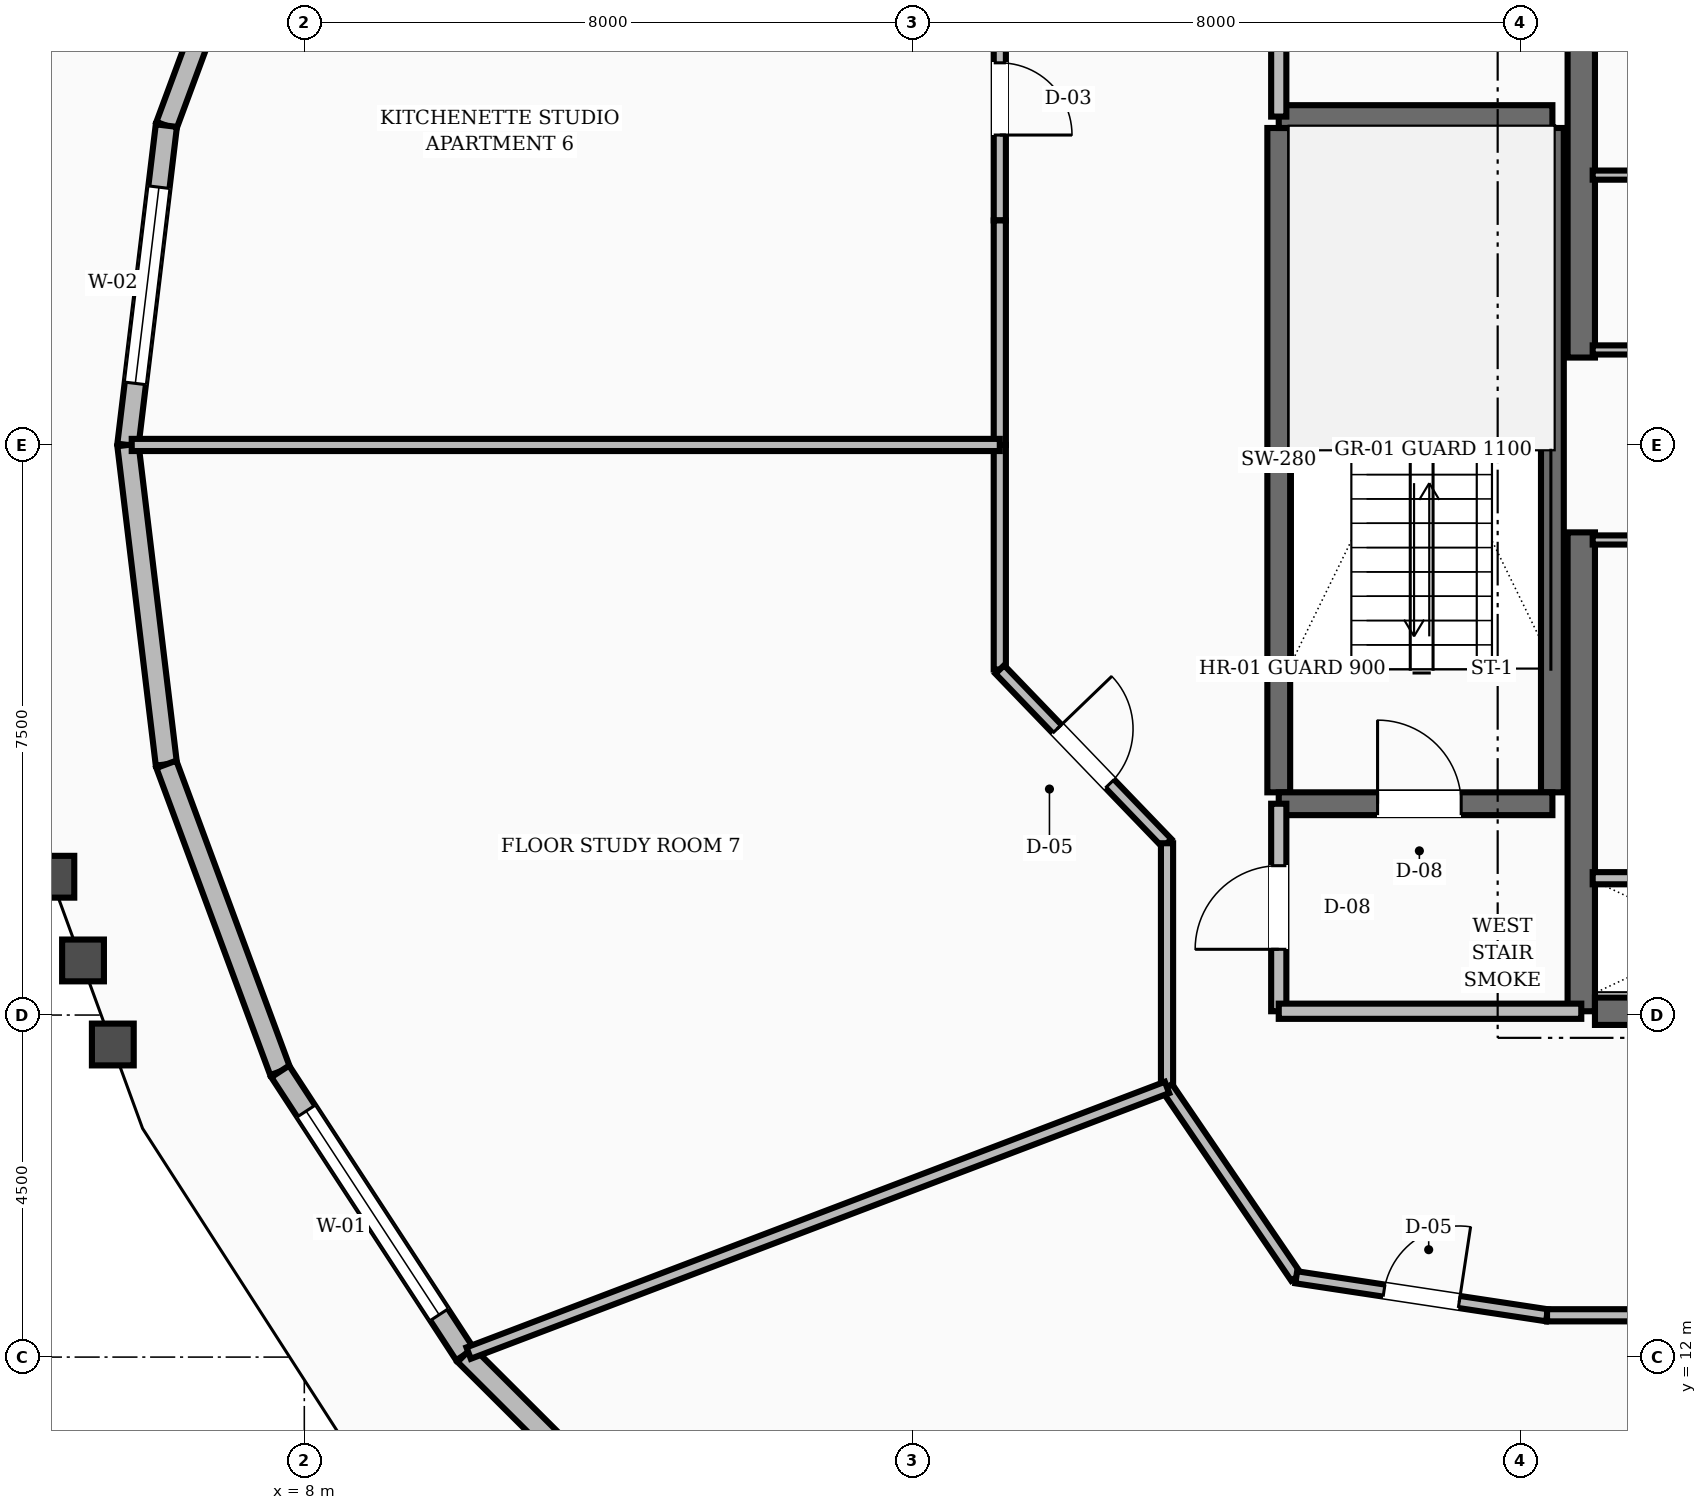
"""IFC4 building model, lengths in metres.
Left out: names, types, materials, properties, quantities, classifications, styles, units other than length and angle.
Written with IfcOpenShell. Run it as: python <this file> out.ifc"""

import sys

from ifc_helpers import new_model, si_unit, direction, frame, frame_2d, origin, place, context, subcontext, project, spatial, rectangle, extrude, element, fill, save


model = new_model("IFC4")
c1 = context("Model", 3, precision=1e-05, world=origin(), true_north=direction((0.0, 1.0)))
c2 = subcontext(c1, "Body", "Model", "MODEL_VIEW")
j1 = project(units=[si_unit("LENGTHUNIT", "METRE"), si_unit("PLANEANGLEUNIT", "RADIAN")], contexts=[c1])
p1 = place(None, origin())
s1 = spatial("IfcSite", under=j1, at=p1, CompositionType="ELEMENT")
p2 = place(p1, origin())
s2 = spatial("IfcBuilding", under=s1, at=p2, CompositionType="ELEMENT")
p3 = place(p2, frame((0.0, 0.0, 153.2)))
s3 = spatial("IfcBuildingStorey", under=s2, at=p3, CompositionType="ELEMENT", Elevation=153.2)
for number, where, z_axis, x_axis in (
    (1, (24.8, 16.55, 0.0), (0.0, 0.0, 1.0), (0.0, 1.0, 0.0)),
    (2, (24.8, 25.15, 0.0), (0.0, 0.0, 1.0), (0.0, 1.0, 0.0)),
):
    element("IfcWall", number, at=place(p3, frame(where, z_axis=z_axis, x_axis=x_axis)), inside=s3, PredefinedType="SHEAR", context=c2, shape_type="SweptSolid", body=[
        extrude(rectangle(XDim=6.3, YDim=0.36, at=frame_2d((3.15, 0.0))), origin(), (0.0, 0.0, 1.0), 3.6),
    ])
p4 = place(p3, frame((24.98, 16.55, 0.0), z_axis=(0.0, 0.0, 1.0), x_axis=(1.0, 0.0, 0.0)))
e3 = element("IfcWall", 3, at=p4, inside=s3, PredefinedType="SHEAR", context=c2, shape_type="SweptSolid", body=[
    extrude(rectangle(XDim=3.22, YDim=0.36, at=frame_2d((1.61, 0.0))), origin(), (0.0, 0.0, 1.0), 3.6),
])
for number, where, z_axis, x_axis in (
    (4, (20.82, 19.43, 0.0), (0.0, 0.0, 1.0), (0.0, 1.0, 0.0)),
    (5, (24.42, 19.43, 0.0), (0.0, 0.0, 1.0), (0.0, 1.0, 0.0)),
):
    element("IfcWall", number, at=place(p3, frame(where, z_axis=z_axis, x_axis=x_axis)), inside=s3, PredefinedType="SHEAR", context=c2, shape_type="SweptSolid", body=[
        extrude(rectangle(XDim=8.74, YDim=0.3, at=frame_2d((4.37, 0.0))), origin(), (0.0, 0.0, 1.0), 3.6),
    ])
p5 = place(p3, frame((20.82, 19.28, 0.0), z_axis=(0.0, 0.0, 1.0), x_axis=(1.0, 0.0, 0.0)))
e6 = element("IfcWall", 6, at=p5, inside=s3, PredefinedType="SHEAR", context=c2, shape_type="SweptSolid", body=[
    extrude(rectangle(XDim=3.6, YDim=0.3, at=frame_2d((1.8, 0.0))), origin(), (0.0, 0.0, 1.0), 3.6),
])
p6 = place(p5, frame((1.3, 0.0, 0.0)))
e7 = element("IfcOpeningElement", 7, at=p6, cuts=e6, PredefinedType="OPENING", context=c2, shape_type="SweptSolid", body=[
    extrude(rectangle(XDim=1.1, YDim=2.1, at=frame_2d((0.55, 1.05))), frame((0.0, 0.16, 0.0), z_axis=(0.0, -1.0, 0.0), x_axis=(1.0, 0.0, 0.0)), (0.0, 0.0, 1.0), 0.32),
])
p7 = place(p3, frame((20.82, 28.32, 0.0), z_axis=(0.0, 0.0, 1.0), x_axis=(1.0, 0.0, 0.0)))
e8 = element("IfcWall", 8, at=p7, inside=s3, PredefinedType="SHEAR", context=c2, shape_type="SweptSolid", body=[
    extrude(rectangle(XDim=3.6, YDim=0.3, at=frame_2d((1.8, 0.0))), origin(), (0.0, 0.0, 1.0), 3.6),
])
p8 = place(p3, frame((7.683, 32.242, 0.0), z_axis=(0.0, 0.0, 1.0), x_axis=(-0.347600366377, -0.937642781284, 0.0)))
e9 = element("IfcWall", 9, at=p8, inside=s3, PredefinedType="STANDARD", context=c2, shape_type="SweptSolid", body=[
    extrude(rectangle(XDim=4.309, YDim=0.28, at=frame_2d((2.155, 0.0))), origin(), (0.0, 0.0, 1.0), 2.82),
])
p9 = place(p3, frame((6.185, 28.201, 0.0), z_axis=(0.0, 0.0, 1.0), x_axis=(-0.119481907098, -0.992836378199, 0.0)))
e10 = element("IfcWall", 10, at=p9, inside=s3, PredefinedType="STANDARD", context=c2, shape_type="SweptSolid", body=[
    extrude(rectangle(XDim=4.232, YDim=0.28, at=frame_2d((2.116, 0.0))), origin(), (0.0, 0.0, 1.0), 2.82),
])
p10 = place(p9, frame((0.816, 0.0, 0.8)))
e11 = element("IfcOpeningElement", 11, at=p10, cuts=e10, PredefinedType="OPENING", context=c2, shape_type="SweptSolid", body=[
    extrude(rectangle(XDim=2.6, YDim=1.65, at=frame_2d((1.3, 0.825))), frame((0.0, 0.15, 0.0), z_axis=(0.0, -1.0, 0.0), x_axis=(1.0, 0.0, 0.0)), (0.0, 0.0, 1.0), 0.3),
])
p11 = place(p3, frame((5.679, 24.0, 0.0), z_axis=(0.0, 0.0, 1.0), x_axis=(0.119481907098, -0.992836378199, 0.0)))
e12 = element("IfcWall", 12, at=p11, inside=s3, PredefinedType="STANDARD", context=c2, shape_type="SweptSolid", body=[
    extrude(rectangle(XDim=4.232, YDim=0.28, at=frame_2d((2.116, 0.0))), origin(), (0.0, 0.0, 1.0), 2.82),
])
p12 = place(p3, frame((6.185, 19.799, 0.0), z_axis=(0.0, 0.0, 1.0), x_axis=(0.347600366377, -0.937642781284, 0.0)))
e13 = element("IfcWall", 13, at=p12, inside=s3, PredefinedType="STANDARD", context=c2, shape_type="SweptSolid", body=[
    extrude(rectangle(XDim=4.309, YDim=0.28, at=frame_2d((2.155, 0.0))), origin(), (0.0, 0.0, 1.0), 2.82),
])
p13 = place(p3, frame((7.683, 15.758, 0.0), z_axis=(0.0, 0.0, 1.0), x_axis=(0.546910623985, -0.837190999338, 0.0)))
e14 = element("IfcWall", 14, at=p13, inside=s3, PredefinedType="STANDARD", context=c2, shape_type="SweptSolid", body=[
    extrude(rectangle(XDim=4.448, YDim=0.28, at=frame_2d((2.224, 0.0))), origin(), (0.0, 0.0, 1.0), 2.82),
])
p14 = place(p13, frame((0.624, 0.0, 0.8)))
e15 = element("IfcOpeningElement", 15, at=p14, cuts=e14, PredefinedType="OPENING", context=c2, shape_type="SweptSolid", body=[
    extrude(rectangle(XDim=3.2, YDim=1.65, at=frame_2d((1.6, 0.825))), frame((0.0, 0.15, 0.0), z_axis=(0.0, -1.0, 0.0), x_axis=(1.0, 0.0, 0.0)), (0.0, 0.0, 1.0), 0.3),
])
p15 = place(p3, frame((10.115, 12.035, 0.0), z_axis=(0.0, 0.0, 1.0), x_axis=(0.708162399008, -0.706049585108, 0.0)))
e16 = element("IfcWall", 16, at=p15, inside=s3, PredefinedType="STANDARD", context=c2, shape_type="SweptSolid", body=[
    extrude(rectangle(XDim=4.622, YDim=0.28, at=frame_2d((2.311, 0.0))), origin(), (0.0, 0.0, 1.0), 2.82),
])
p16 = place(p3, frame((20.82, 16.55, 0.0), z_axis=(0.0, 0.0, 1.0), x_axis=(0.0, 1.0, 0.0)))
e17 = element("IfcWall", 17, at=p16, inside=s3, PredefinedType="SOLIDWALL", context=c2, shape_type="SweptSolid", body=[
    extrude(rectangle(XDim=2.73, YDim=0.2, at=frame_2d((1.365, 0.0))), origin(), (0.0, 0.0, 1.0), 2.8),
])
p17 = place(p16, frame((0.815, 0.0, 0.0)))
e18 = element("IfcOpeningElement", 18, at=p17, cuts=e17, PredefinedType="OPENING", context=c2, shape_type="SweptSolid", body=[
    extrude(rectangle(XDim=1.1, YDim=2.1, at=frame_2d((0.55, 1.05))), frame((0.0, 0.11, 0.0), z_axis=(0.0, -1.0, 0.0), x_axis=(1.0, 0.0, 0.0)), (0.0, 0.0, 1.0), 0.22),
])
p18 = place(p3, frame((20.82, 16.55, 0.0), z_axis=(0.0, 0.0, 1.0), x_axis=(1.0, 0.0, 0.0)))
e19 = element("IfcWall", 19, at=p18, inside=s3, PredefinedType="SOLIDWALL", context=c2, shape_type="SweptSolid", body=[
    extrude(rectangle(XDim=3.98, YDim=0.2, at=frame_2d((1.99, 0.0))), origin(), (0.0, 0.0, 1.0), 2.8),
])
p19 = place(p3, frame((20.82, 28.32, 0.0), z_axis=(0.0, 0.0, 1.0), x_axis=(0.0, 1.0, 0.0)))
e20 = element("IfcWall", 20, at=p19, inside=s3, PredefinedType="SOLIDWALL", context=c2, shape_type="SweptSolid", body=[
    extrude(rectangle(XDim=3.13, YDim=0.2, at=frame_2d((1.565, 0.0))), origin(), (0.0, 0.0, 1.0), 2.8),
])
p20 = place(p19, frame((1.09, 0.0, 0.0)))
e21 = element("IfcOpeningElement", 21, at=p20, cuts=e20, PredefinedType="OPENING", context=c2, shape_type="SweptSolid", body=[
    extrude(rectangle(XDim=0.95, YDim=2.1, at=frame_2d((0.475, 1.05))), frame((0.0, 0.11, 0.0), z_axis=(0.0, -1.0, 0.0), x_axis=(1.0, 0.0, 0.0)), (0.0, 0.0, 1.0), 0.22),
])
p21 = place(p3, frame((24.95, 18.3, 0.0), z_axis=(0.0, 0.0, 1.0), x_axis=(1.0, 0.0, 0.0)))
e22 = element("IfcWall", 22, at=p21, inside=s3, PredefinedType="SOLIDWALL", context=c2, shape_type="SweptSolid", body=[
    extrude(rectangle(XDim=3.2, YDim=0.16, at=frame_2d((1.6, 0.0))), origin(), (0.0, 0.0, 1.0), 2.8),
])
p22 = place(p3, frame((24.95, 25.25, 0.0), z_axis=(0.0, 0.0, 1.0), x_axis=(1.0, 0.0, 0.0)))
e23 = element("IfcWall", 23, at=p22, inside=s3, PredefinedType="PARTITIONING", context=c2, shape_type="SweptSolid", body=[
    extrude(rectangle(XDim=3.2, YDim=0.12, at=frame_2d((1.6, 0.0))), origin(), (0.0, 0.0, 1.0), 2.8),
])
p23 = place(p22, frame((1.125, 0.0, 0.0)))
e24 = element("IfcOpeningElement", 24, at=p23, cuts=e23, PredefinedType="OPENING", context=c2, shape_type="SweptSolid", body=[
    extrude(rectangle(XDim=0.95, YDim=2.1, at=frame_2d((0.475, 1.05))), frame((0.0, 0.07, 0.0), z_axis=(0.0, -1.0, 0.0), x_axis=(1.0, 0.0, 0.0)), (0.0, 0.0, 1.0), 0.14),
])
p24 = place(p3, frame((24.95, 22.75, 0.0), z_axis=(0.0, 0.0, 1.0), x_axis=(1.0, 0.0, 0.0)))
e25 = element("IfcWall", 25, at=p24, inside=s3, PredefinedType="PARTITIONING", context=c2, shape_type="SweptSolid", body=[
    extrude(rectangle(XDim=3.2, YDim=0.12, at=frame_2d((1.6, 0.0))), origin(), (0.0, 0.0, 1.0), 2.8),
])
p25 = place(p24, frame((1.125, 0.0, 0.0)))
e26 = element("IfcOpeningElement", 26, at=p25, cuts=e25, PredefinedType="OPENING", context=c2, shape_type="SweptSolid", body=[
    extrude(rectangle(XDim=0.95, YDim=2.1, at=frame_2d((0.475, 1.05))), frame((0.0, 0.07, 0.0), z_axis=(0.0, -1.0, 0.0), x_axis=(1.0, 0.0, 0.0)), (0.0, 0.0, 1.0), 0.14),
])
p26 = place(p3, frame((24.95, 27.55, 0.0), z_axis=(0.0, 0.0, 1.0), x_axis=(1.0, 0.0, 0.0)))
e27 = element("IfcWall", 27, at=p26, inside=s3, PredefinedType="PARTITIONING", context=c2, shape_type="SweptSolid", body=[
    extrude(rectangle(XDim=3.2, YDim=0.12, at=frame_2d((1.6, 0.0))), origin(), (0.0, 0.0, 1.0), 2.8),
])
p27 = place(p26, frame((1.125, 0.0, 0.0)))
e28 = element("IfcOpeningElement", 28, at=p27, cuts=e27, PredefinedType="OPENING", context=c2, shape_type="SweptSolid", body=[
    extrude(rectangle(XDim=0.95, YDim=2.1, at=frame_2d((0.475, 1.05))), frame((0.0, 0.07, 0.0), z_axis=(0.0, -1.0, 0.0), x_axis=(1.0, 0.0, 0.0)), (0.0, 0.0, 1.0), 0.14),
])
p28 = place(p3, frame((17.15, 30.151, 0.0), z_axis=(0.0, 0.0, 1.0), x_axis=(0.0, -1.0, 0.0)))
e29 = element("IfcWall", 29, at=p28, inside=s3, PredefinedType="SOLIDWALL", context=c2, shape_type="SweptSolid", body=[
    extrude(rectangle(XDim=3.197, YDim=0.16, at=frame_2d((1.599, 0.0))), origin(), (0.0, 0.0, 1.0), 2.8),
])
p29 = place(p28, frame((1.124, 0.0, 0.0)))
e30 = element("IfcOpeningElement", 30, at=p29, cuts=e29, PredefinedType="OPENING", context=c2, shape_type="SweptSolid", body=[
    extrude(rectangle(XDim=0.95, YDim=2.1, at=frame_2d((0.475, 1.05))), frame((0.0, 0.09, 0.0), z_axis=(0.0, -1.0, 0.0), x_axis=(1.0, 0.0, 0.0)), (0.0, 0.0, 1.0), 0.18),
])
for number, where, z_axis, x_axis in (
    (31, (17.15, 26.954, 0.0), (0.0, 0.0, 1.0), (0.0, -1.0, 0.0)),
    (32, (17.15, 24.0, 0.0), (0.0, 0.0, 1.0), (0.0, -1.0, 0.0)),
):
    element("IfcWall", number, at=place(p3, frame(where, z_axis=z_axis, x_axis=x_axis)), inside=s3, PredefinedType="SOLIDWALL", context=c2, shape_type="SweptSolid", body=[
        extrude(rectangle(XDim=2.954, YDim=0.16, at=frame_2d((1.477, 0.0))), origin(), (0.0, 0.0, 1.0), 2.8),
    ])
p30 = place(p3, frame((17.15, 21.046, 0.0), z_axis=(0.0, 0.0, 1.0), x_axis=(0.693473090138, -0.72048252807, 0.0)))
e33 = element("IfcWall", 33, at=p30, inside=s3, PredefinedType="SOLIDWALL", context=c2, shape_type="SweptSolid", body=[
    extrude(rectangle(XDim=3.173, YDim=0.16, at=frame_2d((1.586, 0.0))), origin(), (0.0, 0.0, 1.0), 2.8),
])
p31 = place(p30, frame((1.086, 0.0, 0.0)))
e34 = element("IfcOpeningElement", 34, at=p31, cuts=e33, PredefinedType="OPENING", context=c2, shape_type="SweptSolid", body=[
    extrude(rectangle(XDim=1.0, YDim=2.1, at=frame_2d((0.5, 1.05))), frame((0.0, 0.09, 0.0), z_axis=(0.0, -1.0, 0.0), x_axis=(1.0, 0.0, 0.0)), (0.0, 0.0, 1.0), 0.18),
])
p32 = place(p3, frame((19.35, 18.76, 0.0), z_axis=(0.0, 0.0, 1.0), x_axis=(0.0, -1.0, 0.0)))
e35 = element("IfcWall", 35, at=p32, inside=s3, PredefinedType="SOLIDWALL", context=c2, shape_type="SweptSolid", body=[
    extrude(rectangle(XDim=3.213, YDim=0.16, at=frame_2d((1.606, 0.0))), origin(), (0.0, 0.0, 1.0), 2.8),
])
p33 = place(p3, frame((19.35, 15.548, 0.0), z_axis=(0.0, 0.0, 1.0), x_axis=(0.562674669208, -0.826678423955, 0.0)))
e36 = element("IfcWall", 36, at=p33, inside=s3, PredefinedType="SOLIDWALL", context=c2, shape_type="SweptSolid", body=[
    extrude(rectangle(XDim=3.021, YDim=0.16, at=frame_2d((1.511, 0.0))), origin(), (0.0, 0.0, 1.0), 2.8),
])
p34 = place(p3, frame((21.05, 13.05, 0.0), z_axis=(0.0, 0.0, 1.0), x_axis=(0.988710906508, -0.149835721217, 0.0)))
e37 = element("IfcWall", 37, at=p34, inside=s3, PredefinedType="SOLIDWALL", context=c2, shape_type="SweptSolid", body=[
    extrude(rectangle(XDim=3.337, YDim=0.16, at=frame_2d((1.668, 0.0))), origin(), (0.0, 0.0, 1.0), 2.8),
])
p35 = place(p34, frame((1.168, 0.0, 0.0)))
e38 = element("IfcOpeningElement", 38, at=p35, cuts=e37, PredefinedType="OPENING", context=c2, shape_type="SweptSolid", body=[
    extrude(rectangle(XDim=1.0, YDim=2.1, at=frame_2d((0.5, 1.05))), frame((0.0, 0.09, 0.0), z_axis=(0.0, -1.0, 0.0), x_axis=(1.0, 0.0, 0.0)), (0.0, 0.0, 1.0), 0.18),
])
p36 = place(p3, frame((24.349, 12.55, 0.0), z_axis=(0.0, 0.0, 1.0), x_axis=(1.0, 0.0, 0.0)))
e39 = element("IfcWall", 39, at=p36, inside=s3, PredefinedType="SOLIDWALL", context=c2, shape_type="SweptSolid", body=[
    extrude(rectangle(XDim=2.908, YDim=0.16, at=frame_2d((1.454, 0.0))), origin(), (0.0, 0.0, 1.0), 2.8),
])
p37 = place(p3, frame((17.15, 24.0, 0.0), z_axis=(0.0, 0.0, 1.0), x_axis=(-1.0, 0.0, 0.0)))
e40 = element("IfcWall", 40, at=p37, inside=s3, PredefinedType="SOLIDWALL", context=c2, shape_type="SweptSolid", body=[
    extrude(rectangle(XDim=11.42, YDim=0.16, at=frame_2d((5.71, 0.0))), origin(), (0.0, 0.0, 1.0), 2.8),
])
p38 = place(p3, frame((19.35, 15.548, 0.0), z_axis=(0.0, 0.0, 1.0), x_axis=(-0.934670555549, -0.355515052549, 0.0)))
e41 = element("IfcWall", 41, at=p38, inside=s3, PredefinedType="SOLIDWALL", context=c2, shape_type="SweptSolid", body=[
    extrude(rectangle(XDim=9.831, YDim=0.16, at=frame_2d((4.915, 0.0))), origin(), (0.0, 0.0, 1.0), 2.8),
])
p39 = place(p3, frame((27.257, 12.55, 0.0), z_axis=(0.0, 0.0, 1.0), x_axis=(-0.53362877713, -0.84571882338, 0.0)))
e42 = element("IfcWall", 42, at=p39, inside=s3, PredefinedType="SOLIDWALL", context=c2, shape_type="SweptSolid", body=[
    extrude(rectangle(XDim=9.938, YDim=0.16, at=frame_2d((4.969, 0.0))), origin(), (0.0, 0.0, 1.0), 2.8),
])
p40 = place(p10, origin())
e43 = element("IfcWindow", 43, at=p40, inside=s3, PartitioningType="SINGLE_PANEL", PredefinedType="WINDOW", context=c2, shape_type="SweptSolid", body=[
    extrude(rectangle(XDim=2.6, YDim=1.65, at=frame_2d((1.3, 0.825))), frame((0.0, 0.03, 0.0), z_axis=(0.0, -1.0, 0.0), x_axis=(1.0, 0.0, 0.0)), (0.0, 0.0, 1.0), 0.06),
])
fill(e11, e43)
p41 = place(p14, origin())
e44 = element("IfcWindow", 44, at=p41, inside=s3, PartitioningType="SINGLE_PANEL", PredefinedType="WINDOW", context=c2, shape_type="SweptSolid", body=[
    extrude(rectangle(XDim=3.2, YDim=1.65, at=frame_2d((1.6, 0.825))), frame((0.0, 0.03, 0.0), z_axis=(0.0, -1.0, 0.0), x_axis=(1.0, 0.0, 0.0)), (0.0, 0.0, 1.0), 0.06),
])
fill(e15, e44)
p42 = place(p6, origin())
e45 = element("IfcDoor", 45, at=p42, inside=s3, OperationType="SINGLE_SWING_LEFT", PredefinedType="DOOR", context=c2, shape_type="SweptSolid", body=[
    extrude(rectangle(XDim=1.1, YDim=2.1, at=frame_2d((0.55, 1.05))), frame((0.0, 0.025, 0.0), z_axis=(0.0, -1.0, 0.0), x_axis=(1.0, 0.0, 0.0)), (0.0, 0.0, 1.0), 0.05),
])
fill(e7, e45)
p43 = place(p17, origin())
e46 = element("IfcDoor", 46, at=p43, inside=s3, OperationType="SINGLE_SWING_LEFT", PredefinedType="DOOR", context=c2, shape_type="SweptSolid", body=[
    extrude(rectangle(XDim=1.1, YDim=2.1, at=frame_2d((0.55, 1.05))), frame((0.0, 0.025, 0.0), z_axis=(0.0, -1.0, 0.0), x_axis=(1.0, 0.0, 0.0)), (0.0, 0.0, 1.0), 0.05),
])
fill(e18, e46)
p44 = place(p29, origin())
e47 = element("IfcDoor", 47, at=p44, inside=s3, OperationType="SINGLE_SWING_RIGHT", PredefinedType="DOOR", context=c2, shape_type="SweptSolid", body=[
    extrude(rectangle(XDim=0.95, YDim=2.1, at=frame_2d((0.475, 1.05))), frame((0.0, 0.025, 0.0), z_axis=(0.0, -1.0, 0.0), x_axis=(1.0, 0.0, 0.0)), (0.0, 0.0, 1.0), 0.05),
])
fill(e30, e47)
p45 = place(p31, origin())
e48 = element("IfcDoor", 48, at=p45, inside=s3, OperationType="SINGLE_SWING_LEFT", PredefinedType="DOOR", context=c2, shape_type="SweptSolid", body=[
    extrude(rectangle(XDim=1.0, YDim=2.1, at=frame_2d((0.5, 1.05))), frame((0.0, 0.025, 0.0), z_axis=(0.0, -1.0, 0.0), x_axis=(1.0, 0.0, 0.0)), (0.0, 0.0, 1.0), 0.05),
])
fill(e34, e48)
p46 = place(p35, origin())
e49 = element("IfcDoor", 49, at=p46, inside=s3, OperationType="SINGLE_SWING_RIGHT", PredefinedType="DOOR", context=c2, shape_type="SweptSolid", body=[
    extrude(rectangle(XDim=1.0, YDim=2.1, at=frame_2d((0.5, 1.05))), frame((0.0, 0.025, 0.0), z_axis=(0.0, -1.0, 0.0), x_axis=(1.0, 0.0, 0.0)), (0.0, 0.0, 1.0), 0.05),
])
fill(e38, e49)
save(model, sys.argv[1])
